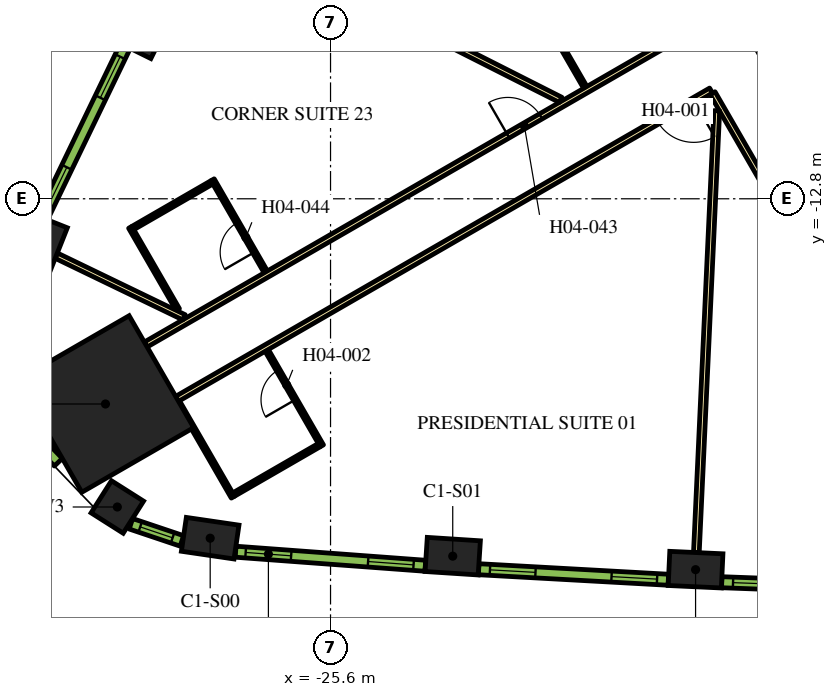
"""IFC4 building model, lengths in metres.
Left out: names, types, materials, properties, quantities, classifications, styles, units other than length and angle.
Written with IfcOpenShell. Run it as: python <this file> out.ifc"""

import sys

from ifc_helpers import new_model, si_unit, direction, frame, frame_2d, origin, origin_2d, place, context, subcontext, project, spatial, rectangle, extrude, element, fill, save


model = new_model("IFC4")
c1 = context("Model", 3, precision=1e-05, world=origin(), true_north=direction((0.0, 1.0)))
c2 = subcontext(c1, "Body", "Model", "MODEL_VIEW")
j1 = project(units=[si_unit("LENGTHUNIT", "METRE"), si_unit("PLANEANGLEUNIT", "RADIAN")], contexts=[c1])
p1 = place(None, origin())
s1 = spatial("IfcSite", under=j1, at=p1, CompositionType="ELEMENT")
p2 = place(p1, origin())
s2 = spatial("IfcBuilding", under=s1, at=p2, CompositionType="ELEMENT")
p3 = place(p2, frame((0.0, 0.0, 66.6)))
s3 = spatial("IfcBuildingStorey", under=s2, at=p3, CompositionType="ELEMENT", Elevation=66.6)
p4 = place(p3, frame((-31.522, -18.199, 0.0), z_axis=(0.0, 0.0, 1.0), x_axis=(-0.866025403784, -0.5, 0.0)))
e1 = element("IfcColumn", 1, at=p4, inside=s3, PredefinedType="COLUMN", context=c2, shape_type="SweptSolid", body=[
    extrude(rectangle(XDim=3.4, YDim=3.4, at=origin_2d()), origin(), (0.0, 0.0, 1.0), 3.9),
])
for number, where, z_axis, x_axis in (
    (2, (-28.767, -21.731, 0.0), (0.0, 0.0, 1.0), (0.989, -0.145, 0.0)),
    (3, (-22.385, -22.204, 0.0), (0.0, 0.0, 1.0), (0.998, -0.065, 0.0)),
    (4, (-15.994, -22.558, 0.0), (0.0, 0.0, 1.0), (0.999, -0.046, 0.0)),
    (5, (-30.421, -8.284, 0.0), (0.0, 0.0, 1.0), (-0.443, -0.897, 0.0)),
    (6, (-33.203, -14.047, 0.0), (0.0, 0.0, 1.0), (-0.369, -0.929, 0.0)),
):
    element("IfcColumn", number, at=place(p3, frame(where, z_axis=z_axis, x_axis=x_axis)), inside=s3, PredefinedType="COLUMN", context=c2, shape_type="SweptSolid", body=[
        extrude(rectangle(XDim=1.4, YDim=0.9, at=origin_2d()), origin(), (0.0, 0.0, 1.0), 3.9),
    ])
p5 = place(p3, frame((-31.21, -20.91, 0.0), z_axis=(0.0, 0.0, 1.0), x_axis=(0.844485001826, -0.535579202071, 0.0)))
e7 = element("IfcColumn", 7, at=p5, inside=s3, PredefinedType="COLUMN", context=c2, shape_type="SweptSolid", body=[
    extrude(rectangle(XDim=1.0, YDim=1.0, at=origin_2d()), origin(), (0.0, 0.0, 1.0), 3.9),
])
p6 = place(p3, frame((-12.134, -11.883, 0.0), z_axis=(0.0, 0.0, 1.0), x_axis=(-0.500005339912, 0.866022320763, 0.0)))
e8 = element("IfcWall", 8, at=p6, inside=s3, PredefinedType="SOLIDWALL", context=c2, shape_type="SweptSolid", body=[
    extrude(rectangle(XDim=9.488, YDim=0.9, at=frame_2d((4.744, 0.0))), origin(), (0.0, 0.0, 1.0), 3.9),
])
p7 = place(p3, frame((-12.885, -9.431, 0.0), z_axis=(0.0, 0.0, 1.0), x_axis=(-0.500020560727, 0.866013532718, 0.0)))
e9 = element("IfcWall", 9, at=p7, inside=s3, PredefinedType="SOLIDWALL", context=c2, shape_type="SweptSolid", body=[
    extrude(rectangle(XDim=3.45, YDim=0.25, at=frame_2d((1.725, 0.0))), origin(), (0.0, 0.0, 1.0), 3.9),
])
p8 = place(p3, frame((-30.463, -16.635, 0.0), z_axis=(0.0, 0.0, 1.0), x_axis=(0.866022394896, 0.500005211512, 0.0)))
e10 = element("IfcWall", 10, at=p8, inside=s3, PredefinedType="PARTITIONING", context=c2, shape_type="SweptSolid", body=[
    extrude(rectangle(XDim=16.144, YDim=0.15, at=frame_2d((8.072, 0.0))), origin(), (0.0, 0.0, 1.0), 2.75),
])
p9 = place(p8, frame((11.004, 0.0, 0.0)))
e11 = element("IfcOpeningElement", 11, at=p9, cuts=e10, PredefinedType="OPENING", context=c2, shape_type="SweptSolid", body=[
    extrude(rectangle(XDim=1.0, YDim=2.1, at=frame_2d((0.5, 1.05))), frame((0.0, 0.085, 0.0), z_axis=(0.0, -1.0, 0.0), x_axis=(1.0, 0.0, 0.0)), (0.0, 0.0, 1.0), 0.17),
])
p10 = place(p3, frame((-15.587, -9.952, 0.0), z_axis=(0.0, 0.0, 1.0), x_axis=(-0.866022197818, -0.500005552856, 0.0)))
e12 = element("IfcWall", 12, at=p10, inside=s3, PredefinedType="PARTITIONING", context=c2, shape_type="SweptSolid", body=[
    extrude(rectangle(XDim=16.224, YDim=0.15, at=frame_2d((8.112, 0.0))), origin(), (0.0, 0.0, 1.0), 2.75),
])
p11 = place(p10, frame((0.527, 0.0, 0.0)))
e13 = element("IfcOpeningElement", 13, at=p11, cuts=e12, PredefinedType="OPENING", context=c2, shape_type="SweptSolid", body=[
    extrude(rectangle(XDim=1.1, YDim=2.1, at=frame_2d((0.55, 1.05))), frame((0.0, 0.085, 0.0), z_axis=(0.0, -1.0, 0.0), x_axis=(1.0, 0.0, 0.0)), (0.0, 0.0, 1.0), 0.17),
])
p12 = place(p3, frame((-12.918, -14.575, 0.0), z_axis=(0.0, 0.0, 1.0), x_axis=(-0.500009150678, 0.866020120573, 0.0)))
e14 = element("IfcWall", 14, at=p12, inside=s3, PredefinedType="PARTITIONING", context=c2, shape_type="SweptSolid", body=[
    extrude(rectangle(XDim=5.258, YDim=0.15, at=frame_2d((2.629, 0.0))), origin(), (0.0, 0.0, 1.0), 2.75),
])
p13 = place(p3, frame((-32.817, -14.296, 0.0), z_axis=(0.0, 0.0, 1.0), x_axis=(0.900616957918, -0.434613730927, 0.0)))
e15 = element("IfcWall", 15, at=p13, inside=s3, PredefinedType="PARTITIONING", context=c2, shape_type="SweptSolid", body=[
    extrude(rectangle(XDim=3.733, YDim=0.15, at=frame_2d((1.867, 0.0))), origin(), (0.0, 0.0, 1.0), 2.75),
])
p14 = place(p3, frame((-29.12, -5.356, 0.0), z_axis=(0.0, 0.0, 1.0), x_axis=(0.892401965553, -0.451241323327, 0.0)))
e16 = element("IfcWall", 16, at=p14, inside=s3, PredefinedType="PARTITIONING", context=c2, shape_type="SweptSolid", body=[
    extrude(rectangle(XDim=10.729, YDim=0.15, at=frame_2d((5.364, 0.0))), origin(), (0.0, 0.0, 1.0), 2.75),
])
p15 = place(p3, frame((-15.973, -22.109, 0.0), z_axis=(0.0, 0.0, 1.0), x_axis=(0.046191717129, 0.998932592955, 0.0)))
e17 = element("IfcWall", 17, at=p15, inside=s3, PredefinedType="PARTITIONING", context=c2, shape_type="SweptSolid", body=[
    extrude(rectangle(XDim=11.638, YDim=0.15, at=frame_2d((5.819, 0.0))), origin(), (0.0, 0.0, 1.0), 2.75),
])
p16 = place(p3, frame((-25.829, -19.3, 0.0), z_axis=(0.0, 0.0, 1.0), x_axis=(-0.50005036918, 0.865996321171, 0.0)))
e18 = element("IfcWall", 18, at=p16, inside=s3, PredefinedType="PARTITIONING", context=c2, shape_type="SweptSolid", body=[
    extrude(rectangle(XDim=2.9, YDim=0.1, at=frame_2d((1.45, 0.0))), origin(), (0.0, 0.0, 1.0), 2.75),
])
p17 = place(p16, frame((1.4, 0.0, 0.0)))
e19 = element("IfcOpeningElement", 19, at=p17, cuts=e18, PredefinedType="OPENING", context=c2, shape_type="SweptSolid", body=[
    extrude(rectangle(XDim=0.9, YDim=2.1, at=frame_2d((0.45, 1.05))), frame((0.0, 0.06, 0.0), z_axis=(0.0, -1.0, 0.0), x_axis=(1.0, 0.0, 0.0)), (0.0, 0.0, 1.0), 0.12),
])
p18 = place(p3, frame((-25.897, -19.282, 0.0), z_axis=(0.0, 0.0, 1.0), x_axis=(-0.866021400173, -0.500006934395, 0.0)))
e20 = element("IfcWall", 20, at=p18, inside=s3, PredefinedType="PARTITIONING", context=c2, shape_type="SweptSolid", body=[
    extrude(rectangle(XDim=2.6, YDim=0.1, at=frame_2d((1.3, 0.0))), origin(), (0.0, 0.0, 1.0), 2.75),
])
p19 = place(p3, frame((-29.617, -18.139, 0.0), z_axis=(0.0, 0.0, 1.0), x_axis=(0.499987231761, -0.866032775405, 0.0)))
e21 = element("IfcWall", 21, at=p19, inside=s3, PredefinedType="PARTITIONING", context=c2, shape_type="SweptSolid", body=[
    extrude(rectangle(XDim=2.9, YDim=0.1, at=frame_2d((1.45, 0.0))), origin(), (0.0, 0.0, 1.0), 2.75),
])
p20 = place(p3, frame((-20.092, -7.8, 0.0), z_axis=(0.0, 0.0, 1.0), x_axis=(0.499940577336, -0.866059708757, 0.0)))
e22 = element("IfcWall", 22, at=p20, inside=s3, PredefinedType="PARTITIONING", context=c2, shape_type="SweptSolid", body=[
    extrude(rectangle(XDim=2.39, YDim=0.1, at=frame_2d((1.195, 0.0))), origin(), (0.0, 0.0, 1.0), 2.75),
])
p21 = place(p3, frame((-27.304, -14.725, 0.0), z_axis=(0.0, 0.0, 1.0), x_axis=(-0.49998411664, 0.866034573852, 0.0)))
e23 = element("IfcWall", 23, at=p21, inside=s3, PredefinedType="PARTITIONING", context=c2, shape_type="SweptSolid", body=[
    extrude(rectangle(XDim=2.8, YDim=0.1, at=frame_2d((1.4, 0.0))), origin(), (0.0, 0.0, 1.0), 2.75),
])
p22 = place(p21, frame((0.6, 0.0, 0.0)))
e24 = element("IfcOpeningElement", 24, at=p22, cuts=e23, PredefinedType="OPENING", context=c2, shape_type="SweptSolid", body=[
    extrude(rectangle(XDim=0.9, YDim=2.1, at=frame_2d((0.45, 1.05))), frame((0.0, 0.06, 0.0), z_axis=(0.0, -1.0, 0.0), x_axis=(1.0, 0.0, 0.0)), (0.0, 0.0, 1.0), 0.12),
])
p23 = place(p3, frame((-28.722, -12.368, 0.0), z_axis=(0.0, 0.0, 1.0), x_axis=(-0.866050077142, -0.499957262057, 0.0)))
e25 = element("IfcWall", 25, at=p23, inside=s3, PredefinedType="PARTITIONING", context=c2, shape_type="SweptSolid", body=[
    extrude(rectangle(XDim=2.4, YDim=0.1, at=frame_2d((1.2, 0.0))), origin(), (0.0, 0.0, 1.0), 2.75),
])
p24 = place(p3, frame((-29.619, -15.715, 0.0), z_axis=(0.0, 0.0, 1.0), x_axis=(-0.500004234368, 0.866022959057, 0.0)))
e26 = element("IfcWall", 26, at=p24, inside=s3, PredefinedType="PARTITIONING", context=c2, shape_type="SweptSolid", body=[
    extrude(rectangle(XDim=2.5, YDim=0.1, at=frame_2d((1.25, 0.0))), origin(), (0.0, 0.0, 1.0), 2.75),
])
p25 = place(p3, frame((-28.098, -22.086, 0.0), z_axis=(0.0, 0.0, 1.0), x_axis=(0.997266290399, -0.073891447643, 0.0)))
e27 = element("IfcWall", 27, at=p25, inside=s3, PredefinedType="SOLIDWALL", context=c2, shape_type="SweptSolid", body=[
    extrude(rectangle(XDim=5.006, YDim=0.29, at=frame_2d((2.503, 0.0))), origin(), (0.0, 0.0, 1.0), 3.65),
])
p26 = place(p25, frame((0.265, 0.0, 0.9)))
e28 = element("IfcOpeningElement", 28, at=p26, cuts=e27, PredefinedType="OPENING", context=c2, shape_type="SweptSolid", body=[
    extrude(rectangle(XDim=1.2, YDim=2.15, at=frame_2d((0.6, 1.075))), frame((0.0, 0.155, 0.0), z_axis=(0.0, -1.0, 0.0), x_axis=(1.0, 0.0, 0.0)), (0.0, 0.0, 1.0), 0.31),
])
p27 = place(p25, frame((3.496, 0.0, 0.9)))
e29 = element("IfcOpeningElement", 29, at=p27, cuts=e27, PredefinedType="OPENING", context=c2, shape_type="SweptSolid", body=[
    extrude(rectangle(XDim=1.2, YDim=2.15, at=frame_2d((0.6, 1.075))), frame((0.0, 0.155, 0.0), z_axis=(0.0, -1.0, 0.0), x_axis=(1.0, 0.0, 0.0)), (0.0, 0.0, 1.0), 0.31),
])
p28 = place(p3, frame((-21.701, -22.547, 0.0), z_axis=(0.0, 0.0, 1.0), x_axis=(0.998464708705, -0.055391564976, 0.0)))
e30 = element("IfcWall", 30, at=p28, inside=s3, PredefinedType="SOLIDWALL", context=c2, shape_type="SweptSolid", body=[
    extrude(rectangle(XDim=4.998, YDim=0.29, at=frame_2d((2.499, 0.0))), origin(), (0.0, 0.0, 1.0), 3.65),
])
p29 = place(p28, frame((0.297, 0.0, 0.9)))
e31 = element("IfcOpeningElement", 31, at=p29, cuts=e30, PredefinedType="OPENING", context=c2, shape_type="SweptSolid", body=[
    extrude(rectangle(XDim=1.2, YDim=2.15, at=frame_2d((0.6, 1.075))), frame((0.0, 0.155, 0.0), z_axis=(0.0, -1.0, 0.0), x_axis=(1.0, 0.0, 0.0)), (0.0, 0.0, 1.0), 0.31),
])
p30 = place(p28, frame((3.501, 0.0, 0.9)))
e32 = element("IfcOpeningElement", 32, at=p30, cuts=e30, PredefinedType="OPENING", context=c2, shape_type="SweptSolid", body=[
    extrude(rectangle(XDim=1.2, YDim=2.15, at=frame_2d((0.6, 1.075))), frame((0.0, 0.155, 0.0), z_axis=(0.0, -1.0, 0.0), x_axis=(1.0, 0.0, 0.0)), (0.0, 0.0, 1.0), 0.31),
])
p31 = place(p3, frame((-15.305, -22.889, 0.0), z_axis=(0.0, 0.0, 1.0), x_axis=(0.999317974969, -0.036926750529, 0.0)))
e33 = element("IfcWall", 33, at=p31, inside=s3, PredefinedType="SOLIDWALL", context=c2, shape_type="SweptSolid", body=[
    extrude(rectangle(XDim=4.998, YDim=0.29, at=frame_2d((2.499, 0.0))), origin(), (0.0, 0.0, 1.0), 3.65),
])
p32 = place(p31, frame((0.297, 0.0, 0.9)))
e34 = element("IfcOpeningElement", 34, at=p32, cuts=e33, PredefinedType="OPENING", context=c2, shape_type="SweptSolid", body=[
    extrude(rectangle(XDim=1.2, YDim=2.15, at=frame_2d((0.6, 1.075))), frame((0.0, 0.155, 0.0), z_axis=(0.0, -1.0, 0.0), x_axis=(1.0, 0.0, 0.0)), (0.0, 0.0, 1.0), 0.31),
])
p33 = place(p31, frame((3.501, 0.0, 0.9)))
e35 = element("IfcOpeningElement", 35, at=p33, cuts=e33, PredefinedType="OPENING", context=c2, shape_type="SweptSolid", body=[
    extrude(rectangle(XDim=1.2, YDim=2.15, at=frame_2d((0.6, 1.075))), frame((0.0, 0.155, 0.0), z_axis=(0.0, -1.0, 0.0), x_axis=(1.0, 0.0, 0.0)), (0.0, 0.0, 1.0), 0.31),
])
p34 = place(p3, frame((-31.0, -8.782, 0.0), z_axis=(0.0, 0.0, 1.0), x_axis=(-0.434664499056, -0.900592456808, 0.0)))
e36 = element("IfcWall", 36, at=p34, inside=s3, PredefinedType="SOLIDWALL", context=c2, shape_type="SweptSolid", body=[
    extrude(rectangle(XDim=5.006, YDim=0.29, at=frame_2d((2.503, 0.0))), origin(), (0.0, 0.0, 1.0), 3.65),
])
p35 = place(p34, frame((0.31, 0.0, 0.9)))
e37 = element("IfcOpeningElement", 37, at=p35, cuts=e36, PredefinedType="OPENING", context=c2, shape_type="SweptSolid", body=[
    extrude(rectangle(XDim=1.2, YDim=2.15, at=frame_2d((0.6, 1.075))), frame((0.0, 0.155, 0.0), z_axis=(0.0, -1.0, 0.0), x_axis=(1.0, 0.0, 0.0)), (0.0, 0.0, 1.0), 0.31),
])
p36 = place(p34, frame((3.541, 0.0, 0.9)))
e38 = element("IfcOpeningElement", 38, at=p36, cuts=e36, PredefinedType="OPENING", context=c2, shape_type="SweptSolid", body=[
    extrude(rectangle(XDim=1.2, YDim=2.15, at=frame_2d((0.6, 1.075))), frame((0.0, 0.155, 0.0), z_axis=(0.0, -1.0, 0.0), x_axis=(1.0, 0.0, 0.0)), (0.0, 0.0, 1.0), 0.31),
])
p37 = place(p3, frame((-33.291, -19.181, 0.0), z_axis=(0.0, 0.0, 1.0), x_axis=(0.692252359589, -0.721655506903, 0.0)))
e39 = element("IfcWall", 39, at=p37, inside=s3, PredefinedType="SOLIDWALL", context=c2, shape_type="SweptSolid", body=[
    extrude(rectangle(XDim=0.764, YDim=0.29, at=frame_2d((0.382, 0.0))), origin(), (0.0, 0.0, 1.0), 3.65),
])
p38 = place(p3, frame((-30.853, -21.352, 0.0), z_axis=(0.0, 0.0, 1.0), x_axis=(0.947903891592, -0.318556450734, 0.0)))
e40 = element("IfcWall", 40, at=p38, inside=s3, PredefinedType="SOLIDWALL", context=c2, shape_type="SweptSolid", body=[
    extrude(rectangle(XDim=1.415, YDim=0.29, at=frame_2d((0.708, 0.0))), origin(), (0.0, 0.0, 1.0), 3.65),
])
p39 = place(p38, frame((0.257, 0.0, 0.9)))
e41 = element("IfcOpeningElement", 41, at=p39, cuts=e40, PredefinedType="OPENING", context=c2, shape_type="SweptSolid", body=[
    extrude(rectangle(XDim=0.9, YDim=2.15, at=frame_2d((0.45, 1.075))), frame((0.0, 0.155, 0.0), z_axis=(0.0, -1.0, 0.0), x_axis=(1.0, 0.0, 0.0)), (0.0, 0.0, 1.0), 0.31),
])
p40 = place(p11, origin())
e42 = element("IfcDoor", 42, at=p40, inside=s3, OperationType="SINGLE_SWING_LEFT", PredefinedType="DOOR", context=c2, shape_type="SweptSolid", body=[
    extrude(rectangle(XDim=1.1, YDim=2.1, at=frame_2d((0.55, 1.05))), frame((0.0, 0.025, 0.0), z_axis=(0.0, -1.0, 0.0), x_axis=(1.0, 0.0, 0.0)), (0.0, 0.0, 1.0), 0.05),
])
fill(e13, e42)
p41 = place(p17, origin())
e43 = element("IfcDoor", 43, at=p41, inside=s3, OperationType="SINGLE_SWING_LEFT", PredefinedType="DOOR", context=c2, shape_type="SweptSolid", body=[
    extrude(rectangle(XDim=0.9, YDim=2.1, at=frame_2d((0.45, 1.05))), frame((0.0, 0.025, 0.0), z_axis=(0.0, -1.0, 0.0), x_axis=(1.0, 0.0, 0.0)), (0.0, 0.0, 1.0), 0.05),
])
fill(e19, e43)
p42 = place(p9, origin())
e44 = element("IfcDoor", 44, at=p42, inside=s3, OperationType="SINGLE_SWING_RIGHT", PredefinedType="DOOR", context=c2, shape_type="SweptSolid", body=[
    extrude(rectangle(XDim=1.0, YDim=2.1, at=frame_2d((0.5, 1.05))), frame((0.0, 0.025, 0.0), z_axis=(0.0, -1.0, 0.0), x_axis=(1.0, 0.0, 0.0)), (0.0, 0.0, 1.0), 0.05),
])
fill(e11, e44)
p43 = place(p22, origin())
e45 = element("IfcDoor", 45, at=p43, inside=s3, OperationType="SINGLE_SWING_LEFT", PredefinedType="DOOR", context=c2, shape_type="SweptSolid", body=[
    extrude(rectangle(XDim=0.9, YDim=2.1, at=frame_2d((0.45, 1.05))), frame((0.0, 0.025, 0.0), z_axis=(0.0, -1.0, 0.0), x_axis=(1.0, 0.0, 0.0)), (0.0, 0.0, 1.0), 0.05),
])
fill(e24, e45)
p44 = place(p26, origin())
e46 = element("IfcWindow", 46, at=p44, inside=s3, PartitioningType="DOUBLE_PANEL_VERTICAL", PredefinedType="WINDOW", context=c2, shape_type="SweptSolid", body=[
    extrude(rectangle(XDim=1.2, YDim=2.15, at=frame_2d((0.6, 1.075))), frame((0.0, 0.015, 0.0), z_axis=(0.0, -1.0, 0.0), x_axis=(1.0, 0.0, 0.0)), (0.0, 0.0, 1.0), 0.06),
])
fill(e28, e46)
p45 = place(p27, origin())
e47 = element("IfcWindow", 47, at=p45, inside=s3, PartitioningType="DOUBLE_PANEL_VERTICAL", PredefinedType="WINDOW", context=c2, shape_type="SweptSolid", body=[
    extrude(rectangle(XDim=1.2, YDim=2.15, at=frame_2d((0.6, 1.075))), frame((0.0, 0.015, 0.0), z_axis=(0.0, -1.0, 0.0), x_axis=(1.0, 0.0, 0.0)), (0.0, 0.0, 1.0), 0.06),
])
fill(e29, e47)
p46 = place(p29, origin())
e48 = element("IfcWindow", 48, at=p46, inside=s3, PartitioningType="DOUBLE_PANEL_VERTICAL", PredefinedType="WINDOW", context=c2, shape_type="SweptSolid", body=[
    extrude(rectangle(XDim=1.2, YDim=2.15, at=frame_2d((0.6, 1.075))), frame((0.0, 0.015, 0.0), z_axis=(0.0, -1.0, 0.0), x_axis=(1.0, 0.0, 0.0)), (0.0, 0.0, 1.0), 0.06),
])
fill(e31, e48)
p47 = place(p30, origin())
e49 = element("IfcWindow", 49, at=p47, inside=s3, PartitioningType="DOUBLE_PANEL_VERTICAL", PredefinedType="WINDOW", context=c2, shape_type="SweptSolid", body=[
    extrude(rectangle(XDim=1.2, YDim=2.15, at=frame_2d((0.6, 1.075))), frame((0.0, 0.015, 0.0), z_axis=(0.0, -1.0, 0.0), x_axis=(1.0, 0.0, 0.0)), (0.0, 0.0, 1.0), 0.06),
])
fill(e32, e49)
p48 = place(p32, origin())
e50 = element("IfcWindow", 50, at=p48, inside=s3, PartitioningType="DOUBLE_PANEL_VERTICAL", PredefinedType="WINDOW", context=c2, shape_type="SweptSolid", body=[
    extrude(rectangle(XDim=1.2, YDim=2.15, at=frame_2d((0.6, 1.075))), frame((0.0, 0.015, 0.0), z_axis=(0.0, -1.0, 0.0), x_axis=(1.0, 0.0, 0.0)), (0.0, 0.0, 1.0), 0.06),
])
fill(e34, e50)
p49 = place(p35, origin())
e51 = element("IfcWindow", 51, at=p49, inside=s3, PartitioningType="DOUBLE_PANEL_VERTICAL", PredefinedType="WINDOW", context=c2, shape_type="SweptSolid", body=[
    extrude(rectangle(XDim=1.2, YDim=2.15, at=frame_2d((0.6, 1.075))), frame((0.0, 0.015, 0.0), z_axis=(0.0, -1.0, 0.0), x_axis=(1.0, 0.0, 0.0)), (0.0, 0.0, 1.0), 0.06),
])
fill(e37, e51)
p50 = place(p36, origin())
e52 = element("IfcWindow", 52, at=p50, inside=s3, PartitioningType="DOUBLE_PANEL_VERTICAL", PredefinedType="WINDOW", context=c2, shape_type="SweptSolid", body=[
    extrude(rectangle(XDim=1.2, YDim=2.15, at=frame_2d((0.6, 1.075))), frame((0.0, 0.015, 0.0), z_axis=(0.0, -1.0, 0.0), x_axis=(1.0, 0.0, 0.0)), (0.0, 0.0, 1.0), 0.06),
])
fill(e38, e52)
p51 = place(p39, origin())
e53 = element("IfcWindow", 53, at=p51, inside=s3, PartitioningType="SINGLE_PANEL", PredefinedType="WINDOW", context=c2, shape_type="SweptSolid", body=[
    extrude(rectangle(XDim=0.9, YDim=2.15, at=frame_2d((0.45, 1.075))), frame((0.0, 0.015, 0.0), z_axis=(0.0, -1.0, 0.0), x_axis=(1.0, 0.0, 0.0)), (0.0, 0.0, 1.0), 0.06),
])
fill(e41, e53)
save(model, sys.argv[1])
